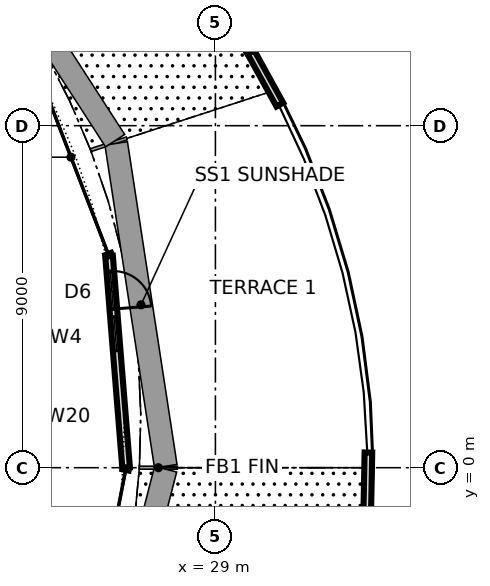
"""IFC4 building model, lengths in metres.
Left out: names, types, materials, properties, quantities, classifications, styles, units other than length and angle.
Written with IfcOpenShell. Run it as: python <this file> out.ifc"""

import sys

from ifc_helpers import new_model, si_unit, direction, frame, frame_2d, origin, place, context, subcontext, project, spatial, rectangle, extrude, element, fill, save


model = new_model("IFC4")
c1 = context("Model", 3, precision=1e-05, world=origin(), true_north=direction((0.0, 1.0)))
c2 = subcontext(c1, "Body", "Model", "MODEL_VIEW")
j1 = project(units=[si_unit("LENGTHUNIT", "METRE"), si_unit("PLANEANGLEUNIT", "RADIAN")], contexts=[c1])
p1 = place(None, origin())
s1 = spatial("IfcSite", under=j1, at=p1, CompositionType="ELEMENT")
p2 = place(p1, origin())
s2 = spatial("IfcBuilding", under=s1, at=p2, CompositionType="ELEMENT")
p3 = place(p2, frame((0.0, 0.0, 19.6)))
s3 = spatial("IfcBuildingStorey", under=s2, at=p3, CompositionType="ELEMENT", Elevation=19.6)
p4 = place(p3, frame((26.65, 0.0, 0.0), z_axis=(0.0, 0.0, 1.0), x_axis=(-0.080267955131, 0.996773321964, 0.0)))
e1 = element("IfcWall", 1, at=p4, inside=s3, PredefinedType="SOLIDWALL", context=c2, shape_type="SweptSolid", body=[
    extrude(rectangle(XDim=5.587, YDim=0.2, at=frame_2d((2.794, 0.0))), origin(), (0.0, 0.0, 1.0), 4.04),
])
p5 = place(p4, frame((4.187, 0.0, 0.0)))
e2 = element("IfcOpeningElement", 2, at=p5, cuts=e1, PredefinedType="OPENING", context=c2, shape_type="SweptSolid", body=[
    extrude(rectangle(XDim=1.0, YDim=2.4, at=frame_2d((0.5, 1.2))), frame((0.0, 0.11, 0.0), z_axis=(0.0, -1.0, 0.0), x_axis=(1.0, 0.0, 0.0)), (0.0, 0.0, 1.0), 0.22),
])
p6 = place(p4, frame((3.087, 0.0, 0.3)))
e3 = element("IfcOpeningElement", 3, at=p6, cuts=e1, PredefinedType="OPENING", context=c2, shape_type="SweptSolid", body=[
    extrude(rectangle(XDim=0.9, YDim=2.1, at=frame_2d((0.45, 1.05))), frame((0.0, 0.11, 0.0), z_axis=(0.0, -1.0, 0.0), x_axis=(1.0, 0.0, 0.0)), (0.0, 0.0, 1.0), 0.22),
])
p7 = place(p4, frame((4.187, 0.0, 2.7)))
e4 = element("IfcOpeningElement", 4, at=p7, cuts=e1, PredefinedType="OPENING", context=c2, shape_type="SweptSolid", body=[
    extrude(rectangle(XDim=1.0, YDim=0.6, at=frame_2d((0.5, 0.3))), frame((0.0, 0.11, 0.0), z_axis=(0.0, -1.0, 0.0), x_axis=(1.0, 0.0, 0.0)), (0.0, 0.0, 1.0), 0.22),
])
p8 = place(p3, frame((30.696, 9.554, 0.0), z_axis=(0.0, 0.0, 1.0), x_axis=(-0.483028292701, 0.87560474442, 0.0)))
e5 = element("IfcWall", 5, at=p8, inside=s3, PredefinedType="PARAPET", context=c2, shape_type="SweptSolid", body=[
    extrude(rectangle(XDim=1.579, YDim=0.2, at=frame_2d((0.79, 0.0))), origin(), (0.0, 0.0, 1.0), 1.1),
])
p9 = place(p3, frame((29.933, 10.936, 0.0), z_axis=(0.0, 0.0, 1.0), x_axis=(-0.539971324998, 0.841683413274, 0.0)))
e6 = element("IfcWall", 6, at=p9, inside=s3, PredefinedType="PARAPET", context=c2, shape_type="SweptSolid", body=[
    extrude(rectangle(XDim=1.57, YDim=0.2, at=frame_2d((0.785, 0.0))), origin(), (0.0, 0.0, 1.0), 1.1),
])
p10 = place(p3, frame((32.995, -1.199, 0.0), z_axis=(0.0, 0.0, 1.0), x_axis=(0.019714907958, 0.999805642315, 0.0)))
e7 = element("IfcWall", 7, at=p10, inside=s3, PredefinedType="PARAPET", context=c2, shape_type="SweptSolid", body=[
    extrude(rectangle(XDim=1.597, YDim=0.2, at=frame_2d((0.799, 0.0))), origin(), (0.0, 0.0, 1.0), 1.1),
])
p11 = place(p5, frame((1.0, 0.0, 0.0), z_axis=(0.0, 0.0, 1.0), x_axis=(-1.0, 0.0, 0.0)))
e8 = element("IfcDoor", 8, at=p11, inside=s3, OperationType="SINGLE_SWING_RIGHT", PredefinedType="DOOR", context=c2, shape_type="SweptSolid", body=[
    extrude(rectangle(XDim=1.0, YDim=2.4, at=frame_2d((0.5, 1.2))), frame((0.0, 0.025, 0.0), z_axis=(0.0, -1.0, 0.0), x_axis=(1.0, 0.0, 0.0)), (0.0, 0.0, 1.0), 0.05),
])
fill(e2, e8)
p12 = place(p6, origin())
e9 = element("IfcWindow", 9, at=p12, inside=s3, PartitioningType="SINGLE_PANEL", PredefinedType="WINDOW", context=c2, shape_type="SweptSolid", body=[
    extrude(rectangle(XDim=0.9, YDim=2.1, at=frame_2d((0.45, 1.05))), frame((0.0, 0.03, 0.0), z_axis=(0.0, -1.0, 0.0), x_axis=(1.0, 0.0, 0.0)), (0.0, 0.0, 1.0), 0.06),
])
fill(e3, e9)
p13 = place(p7, origin())
e10 = element("IfcWindow", 10, at=p13, inside=s3, PartitioningType="SINGLE_PANEL", PredefinedType="WINDOW", context=c2, shape_type="SweptSolid", body=[
    extrude(rectangle(XDim=1.0, YDim=0.6, at=frame_2d((0.5, 0.3))), frame((0.0, 0.03, 0.0), z_axis=(0.0, -1.0, 0.0), x_axis=(1.0, 0.0, 0.0)), (0.0, 0.0, 1.0), 0.06),
])
fill(e4, e10)
save(model, sys.argv[1])
